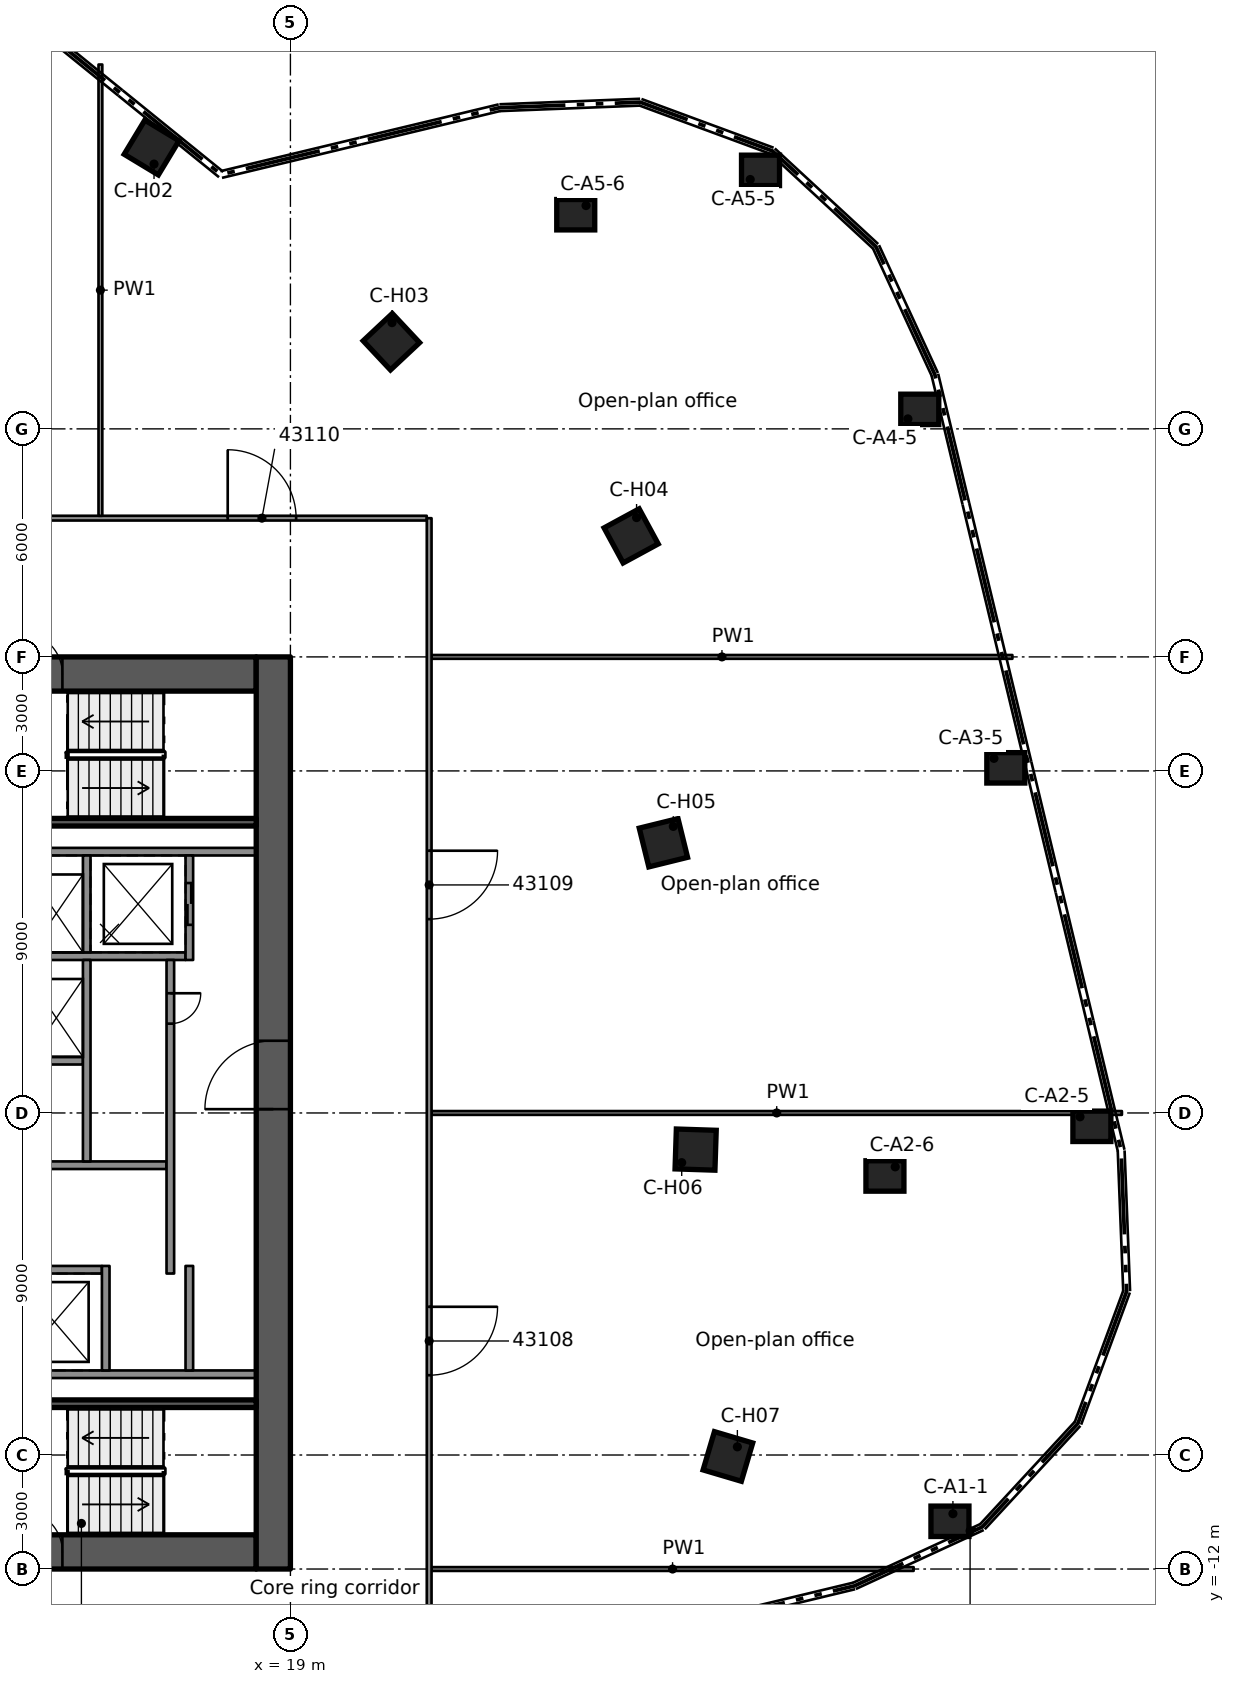
"""IFC4 building model, lengths in metres.
Left out: names, types, materials, properties, quantities, classifications, styles, units other than length and angle.
Written with IfcOpenShell. Run it as: python <this file> out.ifc"""

import sys

from ifc_helpers import new_model, si_unit, direction, frame, frame_2d, origin, origin_2d, place, context, subcontext, project, spatial, rectangle, extrude, element, fill, save


model = new_model("IFC4")
c1 = context("Model", 3, precision=1e-05, world=origin(), true_north=direction((0.0, 1.0)))
c2 = subcontext(c1, "Body", "Model", "MODEL_VIEW")
j1 = project(units=[si_unit("LENGTHUNIT", "METRE"), si_unit("PLANEANGLEUNIT", "RADIAN")], contexts=[c1])
p1 = place(None, origin())
s1 = spatial("IfcSite", under=j1, at=p1, CompositionType="ELEMENT")
p2 = place(p1, origin())
s2 = spatial("IfcBuilding", under=s1, at=p2, CompositionType="ELEMENT")
p3 = place(p2, frame((0.0, 0.0, 214.0)))
s3 = spatial("IfcBuildingStorey", under=s2, at=p3, CompositionType="ELEMENT", Elevation=214.0)
p4 = place(p3, frame((8.9, 11.55, 0.0), z_axis=(0.0, 0.0, 1.0), x_axis=(1.0, 0.0, 0.0)))
e1 = element("IfcWall", 1, at=p4, inside=s3, PredefinedType="SHEAR", context=c2, shape_type="SweptSolid", body=[
    extrude(rectangle(XDim=9.2, YDim=0.9, at=frame_2d((4.6, 0.0))), origin(), (0.0, 0.0, 1.0), 3.5),
])
p5 = place(p4, frame((3.0, 0.0, 0.0)))
e2 = element("IfcOpeningElement", 2, at=p5, cuts=e1, PredefinedType="OPENING", context=c2, shape_type="SweptSolid", body=[
    extrude(rectangle(XDim=1.1, YDim=2.1, at=frame_2d((0.55, 1.05))), frame((0.0, 0.46, 0.0), z_axis=(0.0, -1.0, 0.0), x_axis=(1.0, 0.0, 0.0)), (0.0, 0.0, 1.0), 0.92),
])
p6 = place(p4, frame((0.77, 0.0, 0.0)))
e3 = element("IfcOpeningElement", 3, at=p6, cuts=e1, PredefinedType="OPENING", context=c2, shape_type="SweptSolid", body=[
    extrude(rectangle(XDim=0.9, YDim=2.1, at=frame_2d((0.45, 1.05))), frame((0.0, 0.46, 0.0), z_axis=(0.0, -1.0, 0.0), x_axis=(1.0, 0.0, 0.0)), (0.0, 0.0, 1.0), 0.92),
])
p7 = place(p3, frame((8.9, -11.55, 0.0), z_axis=(0.0, 0.0, 1.0), x_axis=(1.0, 0.0, 0.0)))
e4 = element("IfcWall", 4, at=p7, inside=s3, PredefinedType="SHEAR", context=c2, shape_type="SweptSolid", body=[
    extrude(rectangle(XDim=9.2, YDim=0.9, at=frame_2d((4.6, 0.0))), origin(), (0.0, 0.0, 1.0), 3.5),
])
p8 = place(p7, frame((3.0, 0.0, 0.0)))
e5 = element("IfcOpeningElement", 5, at=p8, cuts=e4, PredefinedType="OPENING", context=c2, shape_type="SweptSolid", body=[
    extrude(rectangle(XDim=1.1, YDim=2.1, at=frame_2d((0.55, 1.05))), frame((0.0, 0.46, 0.0), z_axis=(0.0, -1.0, 0.0), x_axis=(1.0, 0.0, 0.0)), (0.0, 0.0, 1.0), 0.92),
])
p9 = place(p3, frame((18.55, -12.0, 0.0), z_axis=(0.0, 0.0, 1.0), x_axis=(0.0, 1.0, 0.0)))
e6 = element("IfcWall", 6, at=p9, inside=s3, PredefinedType="SHEAR", context=c2, shape_type="SweptSolid", body=[
    extrude(rectangle(XDim=24.0, YDim=0.9, at=frame_2d((12.0, 0.0))), origin(), (0.0, 0.0, 1.0), 3.5),
])
p10 = place(p9, frame((12.1, 0.0, 0.0)))
e7 = element("IfcOpeningElement", 7, at=p10, cuts=e6, PredefinedType="OPENING", context=c2, shape_type="SweptSolid", body=[
    extrude(rectangle(XDim=1.8, YDim=2.1, at=frame_2d((0.9, 1.05))), frame((0.0, 0.46, 0.0), z_axis=(0.0, -1.0, 0.0), x_axis=(1.0, 0.0, 0.0)), (0.0, 0.0, 1.0), 0.92),
])
for number, where, z_axis, x_axis in (
    (8, (36.355, -10.744, 0.0), (0.0, 0.0, 1.0), (1.0, 0.0, 0.0)),
    (9, (40.09, -0.351, 0.0), (0.0, 0.0, 1.0), (1.0, 0.0, 0.0)),
    (10, (34.644, -1.658, 0.0), (0.0, 0.0, 1.0), (1.0, 0.0, 0.0)),
    (11, (37.825, 9.081, 0.0), (0.0, 0.0, 1.0), (1.0, 0.0, 0.0)),
    (12, (35.561, 18.513, 0.0), (0.0, 0.0, 1.0), (1.0, 0.0, 0.0)),
    (13, (31.37, 24.802, 0.0), (0.0, 0.0, 1.0), (1.0, 0.0, 0.0)),
    (14, (26.508, 23.635, 0.0), (0.0, 0.0, 1.0), (1.0, 0.0, 0.0)),
):
    element("IfcColumn", number, at=place(p3, frame(where, z_axis=z_axis, x_axis=x_axis)), inside=s3, PredefinedType="COLUMN", context=c2, shape_type="SweptSolid", body=[
        extrude(rectangle(XDim=1.0, YDim=0.8, at=origin_2d()), origin(), (0.0, 0.0, 1.0), 3.5),
    ])
for number, where, z_axis, x_axis in (
    (15, (15.347, 25.403, 0.0), (0.0, 0.0, 1.0), (0.517, 0.856, 0.0)),
    (16, (21.657, 20.293, 0.0), (0.0, 0.0, 1.0), (0.73, 0.684, 0.0)),
    (17, (27.966, 15.184, 0.0), (0.0, 0.0, 1.0), (0.879, 0.477, 0.0)),
    (18, (28.815, 7.11, 0.0), (0.0, 0.0, 1.0), (0.971, 0.24, 0.0)),
    (19, (29.663, -0.964, 0.0), (0.0, 0.0, 1.0), (0.999, -0.032, 0.0)),
    (20, (30.512, -9.038, 0.0), (0.0, 0.0, 1.0), (0.959, -0.284, 0.0)),
):
    element("IfcColumn", number, at=place(p3, frame(where, z_axis=z_axis, x_axis=x_axis)), inside=s3, PredefinedType="COLUMN", context=c2, shape_type="SweptSolid", body=[
        extrude(rectangle(XDim=1.05, YDim=1.05, at=origin_2d()), origin(), (0.0, 0.0, 1.0), 3.5),
    ])
for number, where, z_axis, x_axis in (
    (21, (11.54, -6.875, 0.0), (0.0, 0.0, 1.0), (1.0, 0.0, 0.0)),
    (22, (11.54, 6.875, 0.0), (0.0, 0.0, 1.0), (1.0, 0.0, 0.0)),
):
    element("IfcWall", number, at=place(p3, frame(where, z_axis=z_axis, x_axis=x_axis)), inside=s3, PredefinedType="SOLIDWALL", context=c2, shape_type="SweptSolid", body=[
        extrude(rectangle(XDim=6.56, YDim=0.2, at=frame_2d((3.28, 0.0))), origin(), (0.0, 0.0, 1.0), 3.08),
    ])
p11 = place(p3, frame((11.54, 4.125, 0.0), z_axis=(0.0, 0.0, 1.0), x_axis=(1.0, 0.0, 0.0)))
e23 = element("IfcWall", 23, at=p11, inside=s3, PredefinedType="SOLIDWALL", context=c2, shape_type="SweptSolid", body=[
    extrude(rectangle(XDim=4.7, YDim=0.2, at=frame_2d((2.35, 0.0))), origin(), (0.0, 0.0, 1.0), 3.08),
])
p12 = place(p3, frame((11.54, 1.375, 0.0), z_axis=(0.0, 0.0, 1.0), x_axis=(1.0, 0.0, 0.0)))
e24 = element("IfcWall", 24, at=p12, inside=s3, PredefinedType="SOLIDWALL", context=c2, shape_type="SweptSolid", body=[
    extrude(rectangle(XDim=2.0, YDim=0.2, at=frame_2d((1.0, 0.0))), origin(), (0.0, 0.0, 1.0), 3.08),
])
p13 = place(p3, frame((11.54, -1.375, 0.0), z_axis=(0.0, 0.0, 1.0), x_axis=(1.0, 0.0, 0.0)))
e25 = element("IfcWall", 25, at=p13, inside=s3, PredefinedType="SOLIDWALL", context=c2, shape_type="SweptSolid", body=[
    extrude(rectangle(XDim=4.2, YDim=0.2, at=frame_2d((2.1, 0.0))), origin(), (0.0, 0.0, 1.0), 3.08),
])
p14 = place(p3, frame((11.54, -4.125, 0.0), z_axis=(0.0, 0.0, 1.0), x_axis=(1.0, 0.0, 0.0)))
e26 = element("IfcWall", 26, at=p14, inside=s3, PredefinedType="SOLIDWALL", context=c2, shape_type="SweptSolid", body=[
    extrude(rectangle(XDim=2.5, YDim=0.2, at=frame_2d((1.25, 0.0))), origin(), (0.0, 0.0, 1.0), 3.08),
])
p15 = place(p3, frame((13.64, 6.775, 0.0), z_axis=(0.0, 0.0, 1.0), x_axis=(0.0, -1.0, 0.0)))
e27 = element("IfcWall", 27, at=p15, inside=s3, PredefinedType="SOLIDWALL", context=c2, shape_type="SweptSolid", body=[
    extrude(rectangle(XDim=2.55, YDim=0.2, at=frame_2d((1.275, 0.0))), origin(), (0.0, 0.0, 1.0), 3.08),
])
p16 = place(p3, frame((13.64, 4.025, 0.0), z_axis=(0.0, 0.0, 1.0), x_axis=(0.0, -1.0, 0.0)))
e28 = element("IfcWall", 28, at=p16, inside=s3, PredefinedType="SOLIDWALL", context=c2, shape_type="SweptSolid", body=[
    extrude(rectangle(XDim=5.3, YDim=0.2, at=frame_2d((2.65, 0.0))), origin(), (0.0, 0.0, 1.0), 3.08),
])
p17 = place(p3, frame((14.14, -4.025, 0.0), z_axis=(0.0, 0.0, 1.0), x_axis=(0.0, -1.0, 0.0)))
e29 = element("IfcWall", 29, at=p17, inside=s3, PredefinedType="SOLIDWALL", context=c2, shape_type="SweptSolid", body=[
    extrude(rectangle(XDim=2.75, YDim=0.2, at=frame_2d((1.375, 0.0))), origin(), (0.0, 0.0, 1.0), 3.08),
])
p18 = place(p3, frame((16.34, 6.775, 0.0), z_axis=(0.0, 0.0, 1.0), x_axis=(0.0, -1.0, 0.0)))
e30 = element("IfcWall", 30, at=p18, inside=s3, PredefinedType="SOLIDWALL", context=c2, shape_type="SweptSolid", body=[
    extrude(rectangle(XDim=2.75, YDim=0.2, at=frame_2d((1.375, 0.0))), origin(), (0.0, 0.0, 1.0), 3.08),
])
p19 = place(p18, frame((0.725, 0.0, 0.0)))
e31 = element("IfcOpeningElement", 31, at=p19, cuts=e30, PredefinedType="OPENING", context=c2, shape_type="SweptSolid", body=[
    extrude(rectangle(XDim=1.1, YDim=2.1, at=frame_2d((0.55, 1.05))), frame((0.0, 0.11, 0.0), z_axis=(0.0, -1.0, 0.0), x_axis=(1.0, 0.0, 0.0)), (0.0, 0.0, 1.0), 0.22),
])
p20 = place(p3, frame((15.84, 4.025, 0.0), z_axis=(0.0, 0.0, 1.0), x_axis=(0.0, -1.0, 0.0)))
e32 = element("IfcWall", 32, at=p20, inside=s3, PredefinedType="SOLIDWALL", context=c2, shape_type="SweptSolid", body=[
    extrude(rectangle(XDim=8.25, YDim=0.2, at=frame_2d((4.125, 0.0))), origin(), (0.0, 0.0, 1.0), 3.08),
])
p21 = place(p20, frame((0.875, 0.0, 0.0)))
e33 = element("IfcOpeningElement", 33, at=p21, cuts=e32, PredefinedType="OPENING", context=c2, shape_type="SweptSolid", body=[
    extrude(rectangle(XDim=0.8, YDim=2.1, at=frame_2d((0.4, 1.05))), frame((0.0, 0.11, 0.0), z_axis=(0.0, -1.0, 0.0), x_axis=(1.0, 0.0, 0.0)), (0.0, 0.0, 1.0), 0.22),
])
p22 = place(p3, frame((16.34, -4.025, 0.0), z_axis=(0.0, 0.0, 1.0), x_axis=(0.0, -1.0, 0.0)))
e34 = element("IfcWall", 34, at=p22, inside=s3, PredefinedType="SOLIDWALL", context=c2, shape_type="SweptSolid", body=[
    extrude(rectangle(XDim=2.75, YDim=0.2, at=frame_2d((1.375, 0.0))), origin(), (0.0, 0.0, 1.0), 3.08),
])
for number, where, z_axis, x_axis in (
    (35, (11.54, -7.65, 0.0), (0.0, 0.0, 1.0), (1.0, 0.0, 0.0)),
    (36, (11.54, 7.65, 0.0), (0.0, 0.0, 1.0), (1.0, 0.0, 0.0)),
):
    element("IfcWall", number, at=place(p3, frame(where, z_axis=z_axis, x_axis=x_axis)), inside=s3, PredefinedType="SOLIDWALL", context=c2, shape_type="SweptSolid", body=[
        extrude(rectangle(XDim=6.56, YDim=0.2, at=frame_2d((3.28, 0.0))), origin(), (0.0, 0.0, 1.0), 3.08),
    ])
p23 = place(p3, frame((22.713, -12.0, 0.0), z_axis=(0.0, 0.0, 1.0), x_axis=(1.0, 0.0, 0.0)))
e37 = element("IfcWall", 37, at=p23, inside=s3, PredefinedType="PARTITIONING", context=c2, shape_type="SweptSolid", body=[
    extrude(rectangle(XDim=12.686, YDim=0.1, at=frame_2d((6.343, 0.0))), origin(), (0.0, 0.0, 1.0), 3.06),
])
p24 = place(p3, frame((22.713, 0.0, 0.0), z_axis=(0.0, 0.0, 1.0), x_axis=(1.0, 0.0, 0.0)))
e38 = element("IfcWall", 38, at=p24, inside=s3, PredefinedType="PARTITIONING", context=c2, shape_type="SweptSolid", body=[
    extrude(rectangle(XDim=18.167, YDim=0.1, at=frame_2d((9.083, 0.0))), origin(), (0.0, 0.0, 1.0), 3.06),
])
p25 = place(p3, frame((22.713, 12.0, 0.0), z_axis=(0.0, 0.0, 1.0), x_axis=(1.0, 0.0, 0.0)))
e39 = element("IfcWall", 39, at=p25, inside=s3, PredefinedType="PARTITIONING", context=c2, shape_type="SweptSolid", body=[
    extrude(rectangle(XDim=15.285, YDim=0.1, at=frame_2d((7.643, 0.0))), origin(), (0.0, 0.0, 1.0), 3.06),
])
p26 = place(p3, frame((12.311, 15.651, 0.0), z_axis=(0.0, 0.0, 1.0), x_axis=(1.0, 0.0, 0.0)))
e40 = element("IfcWall", 40, at=p26, inside=s3, PredefinedType="PARTITIONING", context=c2, shape_type="SweptSolid", body=[
    extrude(rectangle(XDim=10.276, YDim=0.125, at=frame_2d((5.138, 0.0))), origin(), (0.0, 0.0, 1.0), 3.06),
])
p27 = place(p26, frame((5.039, 0.0, 0.0)))
e41 = element("IfcOpeningElement", 41, at=p27, cuts=e40, PredefinedType="OPENING", context=c2, shape_type="SweptSolid", body=[
    extrude(rectangle(XDim=1.8, YDim=2.1, at=frame_2d((0.9, 1.05))), frame((0.0, 0.073, 0.0), z_axis=(0.0, -1.0, 0.0), x_axis=(1.0, 0.0, 0.0)), (0.0, 0.0, 1.0), 0.145),
])
p28 = place(p3, frame((22.651, 15.65, 0.0), z_axis=(0.0, 0.0, 1.0), x_axis=(0.0, -1.0, 0.0)))
e42 = element("IfcWall", 42, at=p28, inside=s3, PredefinedType="PARTITIONING", context=c2, shape_type="SweptSolid", body=[
    extrude(rectangle(XDim=31.3, YDim=0.125, at=frame_2d((15.65, 0.0))), origin(), (0.0, 0.0, 1.0), 3.06),
])
p29 = place(p28, frame((20.75, 0.0, 0.0)))
e43 = element("IfcOpeningElement", 43, at=p29, cuts=e42, PredefinedType="OPENING", context=c2, shape_type="SweptSolid", body=[
    extrude(rectangle(XDim=1.8, YDim=2.1, at=frame_2d((0.9, 1.05))), frame((0.0, 0.073, 0.0), z_axis=(0.0, -1.0, 0.0), x_axis=(1.0, 0.0, 0.0)), (0.0, 0.0, 1.0), 0.145),
])
p30 = place(p28, frame((8.75, 0.0, 0.0)))
e44 = element("IfcOpeningElement", 44, at=p30, cuts=e42, PredefinedType="OPENING", context=c2, shape_type="SweptSolid", body=[
    extrude(rectangle(XDim=1.8, YDim=2.1, at=frame_2d((0.9, 1.05))), frame((0.0, 0.073, 0.0), z_axis=(0.0, -1.0, 0.0), x_axis=(1.0, 0.0, 0.0)), (0.0, 0.0, 1.0), 0.145),
])
p31 = place(p3, frame((14.0, 15.713, 0.0), z_axis=(0.0, 0.0, 1.0), x_axis=(0.0, 1.0, 0.0)))
e45 = element("IfcWall", 45, at=p31, inside=s3, PredefinedType="PARTITIONING", context=c2, shape_type="SweptSolid", body=[
    extrude(rectangle(XDim=11.874, YDim=0.1, at=frame_2d((5.937, 0.0))), origin(), (0.0, 0.0, 1.0), 3.06),
])
p32 = place(p19, origin())
e46 = element("IfcDoor", 46, at=p32, inside=s3, OperationType="DOUBLE_DOOR_SLIDING", PredefinedType="DOOR", context=c2, shape_type="SweptSolid", body=[
    extrude(rectangle(XDim=1.1, YDim=2.1, at=frame_2d((0.55, 1.05))), frame((0.0, 0.025, 0.0), z_axis=(0.0, -1.0, 0.0), x_axis=(1.0, 0.0, 0.0)), (0.0, 0.0, 1.0), 0.05),
])
fill(e31, e46)
p33 = place(p21, origin())
e47 = element("IfcDoor", 47, at=p33, inside=s3, OperationType="SINGLE_SWING_LEFT", PredefinedType="DOOR", context=c2, shape_type="SweptSolid", body=[
    extrude(rectangle(XDim=0.8, YDim=2.1, at=frame_2d((0.4, 1.05))), frame((0.0, 0.025, 0.0), z_axis=(0.0, -1.0, 0.0), x_axis=(1.0, 0.0, 0.0)), (0.0, 0.0, 1.0), 0.05),
])
fill(e33, e47)
p34 = place(p10, origin())
e48 = element("IfcDoor", 48, at=p34, inside=s3, OperationType="SINGLE_SWING_RIGHT", PredefinedType="DOOR", context=c2, shape_type="SweptSolid", body=[
    extrude(rectangle(XDim=1.8, YDim=2.1, at=frame_2d((0.9, 1.05))), frame((0.0, 0.025, 0.0), z_axis=(0.0, -1.0, 0.0), x_axis=(1.0, 0.0, 0.0)), (0.0, 0.0, 1.0), 0.05),
])
fill(e7, e48)
p35 = place(p8, origin())
e49 = element("IfcDoor", 49, at=p35, inside=s3, OperationType="SINGLE_SWING_LEFT", PredefinedType="DOOR", context=c2, shape_type="SweptSolid", body=[
    extrude(rectangle(XDim=1.1, YDim=2.1, at=frame_2d((0.55, 1.05))), frame((0.0, 0.025, 0.0), z_axis=(0.0, -1.0, 0.0), x_axis=(1.0, 0.0, 0.0)), (0.0, 0.0, 1.0), 0.05),
])
fill(e5, e49)
p36 = place(p5, origin())
e50 = element("IfcDoor", 50, at=p36, inside=s3, OperationType="SINGLE_SWING_LEFT", PredefinedType="DOOR", context=c2, shape_type="SweptSolid", body=[
    extrude(rectangle(XDim=1.1, YDim=2.1, at=frame_2d((0.55, 1.05))), frame((0.0, 0.025, 0.0), z_axis=(0.0, -1.0, 0.0), x_axis=(1.0, 0.0, 0.0)), (0.0, 0.0, 1.0), 0.05),
])
fill(e2, e50)
p37 = place(p29, origin())
e51 = element("IfcDoor", 51, at=p37, inside=s3, OperationType="DOUBLE_DOOR_SINGLE_SWING", PredefinedType="DOOR", context=c2, shape_type="SweptSolid", body=[
    extrude(rectangle(XDim=1.8, YDim=2.1, at=frame_2d((0.9, 1.05))), frame((0.0, 0.025, 0.0), z_axis=(0.0, -1.0, 0.0), x_axis=(1.0, 0.0, 0.0)), (0.0, 0.0, 1.0), 0.05),
])
fill(e43, e51)
p38 = place(p30, origin())
e52 = element("IfcDoor", 52, at=p38, inside=s3, OperationType="DOUBLE_DOOR_SINGLE_SWING", PredefinedType="DOOR", context=c2, shape_type="SweptSolid", body=[
    extrude(rectangle(XDim=1.8, YDim=2.1, at=frame_2d((0.9, 1.05))), frame((0.0, 0.025, 0.0), z_axis=(0.0, -1.0, 0.0), x_axis=(1.0, 0.0, 0.0)), (0.0, 0.0, 1.0), 0.05),
])
fill(e44, e52)
p39 = place(p27, origin())
e53 = element("IfcDoor", 53, at=p39, inside=s3, OperationType="DOUBLE_DOOR_SINGLE_SWING", PredefinedType="DOOR", context=c2, shape_type="SweptSolid", body=[
    extrude(rectangle(XDim=1.8, YDim=2.1, at=frame_2d((0.9, 1.05))), frame((0.0, 0.025, 0.0), z_axis=(0.0, -1.0, 0.0), x_axis=(1.0, 0.0, 0.0)), (0.0, 0.0, 1.0), 0.05),
])
fill(e41, e53)
save(model, sys.argv[1])
